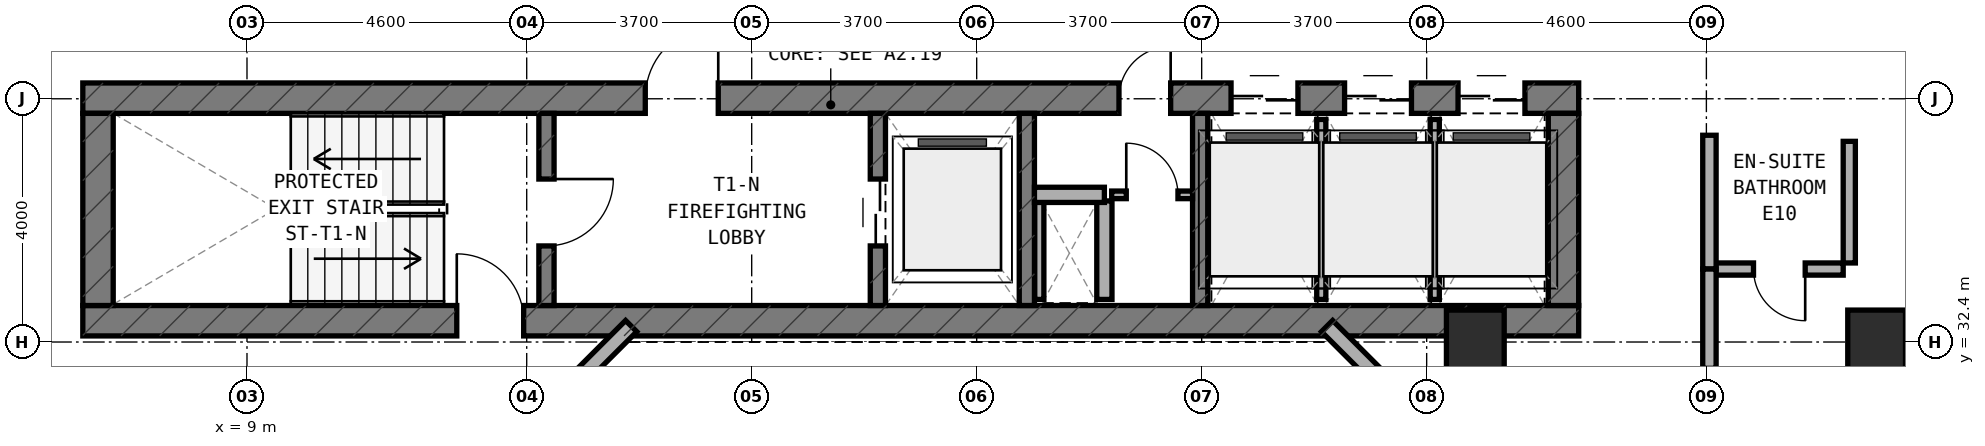
"""IFC4 building model, lengths in metres.
Left out: names, types, materials, properties, quantities, classifications, styles, units other than length and angle.
Written with IfcOpenShell. Run it as: python <this file> out.ifc"""

import sys

from ifc_helpers import new_model, si_unit, direction, frame, frame_2d, origin, origin_2d, place, context, subcontext, project, spatial, rectangle, extrude, element, fill, save


model = new_model("IFC4")
c1 = context("Model", 3, precision=1e-05, world=origin(), true_north=direction((0.0, 1.0)))
c2 = subcontext(c1, "Body", "Model", "MODEL_VIEW")
j1 = project(units=[si_unit("LENGTHUNIT", "METRE"), si_unit("PLANEANGLEUNIT", "RADIAN")], contexts=[c1])
p1 = place(None, origin())
s1 = spatial("IfcSite", under=j1, at=p1, CompositionType="ELEMENT")
p2 = place(p1, origin())
s2 = spatial("IfcBuilding", under=s1, at=p2, CompositionType="ELEMENT")
p3 = place(p2, frame((0.0, 0.0, 80.0)))
s3 = spatial("IfcBuildingStorey", under=s2, at=p3, CompositionType="ELEMENT", Elevation=80.0)
p4 = place(p3, frame((6.3, 32.75, 0.0), z_axis=(0.0, 0.0, 1.0), x_axis=(1.0, 0.0, 0.0)))
e1 = element("IfcWall", 1, at=p4, inside=s3, PredefinedType="SHEAR", context=c2, shape_type="SweptSolid", body=[
    extrude(rectangle(XDim=24.6, YDim=0.5, at=frame_2d((12.3, 0.0))), origin(), (0.0, 0.0, 1.0), 3.5),
])
p5 = place(p4, frame((6.15, 0.0, 0.0)))
e2 = element("IfcOpeningElement", 2, at=p5, cuts=e1, PredefinedType="OPENING", context=c2, shape_type="SweptSolid", body=[
    extrude(rectangle(XDim=1.1, YDim=2.15, at=frame_2d((0.55, 1.075))), frame((0.0, 0.26, 0.0), z_axis=(0.0, -1.0, 0.0), x_axis=(1.0, 0.0, 0.0)), (0.0, 0.0, 1.0), 0.52),
])
p6 = place(p3, frame((6.3, 36.41, 0.0), z_axis=(0.0, 0.0, 1.0), x_axis=(1.0, 0.0, 0.0)))
e3 = element("IfcWall", 3, at=p6, inside=s3, PredefinedType="SHEAR", context=c2, shape_type="SweptSolid", body=[
    extrude(rectangle(XDim=24.6, YDim=0.5, at=frame_2d((12.3, 0.0))), origin(), (0.0, 0.0, 1.0), 3.5),
])
p7 = place(p6, frame((9.25, 0.0, 0.0)))
e4 = element("IfcOpeningElement", 4, at=p7, cuts=e3, PredefinedType="OPENING", context=c2, shape_type="SweptSolid", body=[
    extrude(rectangle(XDim=1.2, YDim=2.15, at=frame_2d((0.6, 1.075))), frame((0.0, 0.26, 0.0), z_axis=(0.0, -1.0, 0.0), x_axis=(1.0, 0.0, 0.0)), (0.0, 0.0, 1.0), 0.52),
])
p8 = place(p6, frame((17.04, 0.0, 0.0)))
e5 = element("IfcOpeningElement", 5, at=p8, cuts=e3, PredefinedType="OPENING", context=c2, shape_type="SweptSolid", body=[
    extrude(rectangle(XDim=0.85, YDim=2.1, at=frame_2d((0.425, 1.05))), frame((0.0, 0.26, 0.0), z_axis=(0.0, -1.0, 0.0), x_axis=(1.0, 0.0, 0.0)), (0.0, 0.0, 1.0), 0.52),
])
p9 = place(p6, frame((18.883, 0.0, 0.0)))
e6 = element("IfcOpeningElement", 6, at=p9, cuts=e3, PredefinedType="OPENING", context=c2, shape_type="SweptSolid", body=[
    extrude(rectangle(XDim=1.1, YDim=2.15, at=frame_2d((0.55, 1.075))), frame((0.0, 0.26, 0.0), z_axis=(0.0, -1.0, 0.0), x_axis=(1.0, 0.0, 0.0)), (0.0, 0.0, 1.0), 0.52),
])
p10 = place(p6, frame((20.75, 0.0, 0.0)))
e7 = element("IfcOpeningElement", 7, at=p10, cuts=e3, PredefinedType="OPENING", context=c2, shape_type="SweptSolid", body=[
    extrude(rectangle(XDim=1.1, YDim=2.15, at=frame_2d((0.55, 1.075))), frame((0.0, 0.26, 0.0), z_axis=(0.0, -1.0, 0.0), x_axis=(1.0, 0.0, 0.0)), (0.0, 0.0, 1.0), 0.52),
])
p11 = place(p6, frame((22.616, 0.0, 0.0)))
e8 = element("IfcOpeningElement", 8, at=p11, cuts=e3, PredefinedType="OPENING", context=c2, shape_type="SweptSolid", body=[
    extrude(rectangle(XDim=1.1, YDim=2.15, at=frame_2d((0.55, 1.075))), frame((0.0, 0.26, 0.0), z_axis=(0.0, -1.0, 0.0), x_axis=(1.0, 0.0, 0.0)), (0.0, 0.0, 1.0), 0.52),
])
for number, where, z_axis, x_axis in (
    (9, (6.55, 33.0, 0.0), (0.0, 0.0, 1.0), (0.0, 1.0, 0.0)),
    (10, (30.65, 33.0, 0.0), (0.0, 0.0, 1.0), (0.0, 1.0, 0.0)),
):
    element("IfcWall", number, at=place(p3, frame(where, z_axis=z_axis, x_axis=x_axis)), inside=s3, PredefinedType="SHEAR", context=c2, shape_type="SweptSolid", body=[
        extrude(rectangle(XDim=3.16, YDim=0.5, at=frame_2d((1.58, 0.0))), origin(), (0.0, 0.0, 1.0), 3.5),
    ])
p12 = place(p3, frame((13.925, 33.0, 0.0), z_axis=(0.0, 0.0, 1.0), x_axis=(0.0, 1.0, 0.0)))
e11 = element("IfcWall", 11, at=p12, inside=s3, PredefinedType="STANDARD", context=c2, shape_type="SweptSolid", body=[
    extrude(rectangle(XDim=3.16, YDim=0.25, at=frame_2d((1.58, 0.0))), origin(), (0.0, 0.0, 1.0), 3.22),
])
p13 = place(p12, frame((0.98, 0.0, 0.0)))
e12 = element("IfcOpeningElement", 12, at=p13, cuts=e11, PredefinedType="OPENING", context=c2, shape_type="SweptSolid", body=[
    extrude(rectangle(XDim=1.1, YDim=2.15, at=frame_2d((0.55, 1.075))), frame((0.0, 0.135, 0.0), z_axis=(0.0, -1.0, 0.0), x_axis=(1.0, 0.0, 0.0)), (0.0, 0.0, 1.0), 0.27),
])
p14 = place(p3, frame((19.375, 33.0, 0.0), z_axis=(0.0, 0.0, 1.0), x_axis=(0.0, 1.0, 0.0)))
e13 = element("IfcWall", 13, at=p14, inside=s3, PredefinedType="STANDARD", context=c2, shape_type="SweptSolid", body=[
    extrude(rectangle(XDim=3.16, YDim=0.25, at=frame_2d((1.58, 0.0))), origin(), (0.0, 0.0, 1.0), 3.22),
])
p15 = place(p14, frame((0.98, 0.0, 0.0)))
e14 = element("IfcOpeningElement", 14, at=p15, cuts=e13, PredefinedType="OPENING", context=c2, shape_type="SweptSolid", body=[
    extrude(rectangle(XDim=1.1, YDim=2.15, at=frame_2d((0.55, 1.075))), frame((0.0, 0.135, 0.0), z_axis=(0.0, -1.0, 0.0), x_axis=(1.0, 0.0, 0.0)), (0.0, 0.0, 1.0), 0.27),
])
for number, where, z_axis, x_axis in (
    (15, (21.825, 33.0, 0.0), (0.0, 0.0, 1.0), (0.0, 1.0, 0.0)),
    (16, (24.675, 33.0, 0.0), (0.0, 0.0, 1.0), (0.0, 1.0, 0.0)),
):
    element("IfcWall", number, at=place(p3, frame(where, z_axis=z_axis, x_axis=x_axis)), inside=s3, PredefinedType="STANDARD", context=c2, shape_type="SweptSolid", body=[
        extrude(rectangle(XDim=3.16, YDim=0.25, at=frame_2d((1.58, 0.0))), origin(), (0.0, 0.0, 1.0), 3.22),
    ])
for number, where, z_axis, x_axis in (
    (17, (35.8, 32.35, 0.0), (0.0, 0.0, 1.0), (1.0, 0.0, 0.0)),
    (18, (29.2, 32.35, 0.0), (0.0, 0.0, 1.0), (1.0, 0.0, 0.0)),
):
    element("IfcColumn", number, at=place(p3, frame(where, z_axis=z_axis, x_axis=x_axis)), inside=s3, PredefinedType="COLUMN", context=c2, shape_type="SweptSolid", body=[
        extrude(rectangle(XDim=0.95, YDim=1.15, at=origin_2d()), origin(), (0.0, 0.0, 1.0), 3.5),
    ])
p16 = place(p3, frame((28.596, 30.828, 0.0), z_axis=(0.0, 0.0, 1.0), x_axis=(-0.707059717605, 0.707153841636, 0.0)))
e19 = element("IfcWall", 19, at=p16, inside=s3, PredefinedType="STANDARD", context=c2, shape_type="SweptSolid", body=[
    extrude(rectangle(XDim=2.594, YDim=0.26, at=frame_2d((1.297, 0.0))), origin(), (0.0, 0.0, 1.0), 3.22),
])
p17 = place(p3, frame((15.318, 32.662, 0.0), z_axis=(0.0, 0.0, 1.0), x_axis=(-0.707106781187, -0.707106781187, 0.0)))
e20 = element("IfcWall", 20, at=p17, inside=s3, PredefinedType="STANDARD", context=c2, shape_type="SweptSolid", body=[
    extrude(rectangle(XDim=2.594, YDim=0.26, at=frame_2d((1.297, 0.0))), origin(), (0.0, 0.0, 1.0), 3.22),
])
p18 = place(p3, frame((22.03, 33.1, 0.0), z_axis=(0.0, 0.0, 1.0), x_axis=(0.0, 1.0, 0.0)))
e21 = element("IfcWall", 21, at=p18, inside=s3, PredefinedType="PARTITIONING", context=c2, shape_type="SweptSolid", body=[
    extrude(rectangle(XDim=1.62, YDim=0.15, at=frame_2d((0.81, 0.0))), origin(), (0.0, 0.0, 1.0), 3.22),
])
p19 = place(p3, frame((23.1, 33.1, 0.0), z_axis=(0.0, 0.0, 1.0), x_axis=(0.0, 1.0, 0.0)))
e22 = element("IfcWall", 22, at=p19, inside=s3, PredefinedType="SOLIDWALL", context=c2, shape_type="SweptSolid", body=[
    extrude(rectangle(XDim=1.62, YDim=0.25, at=frame_2d((0.81, 0.0))), origin(), (0.0, 0.0, 1.0), 3.22),
])
p20 = place(p3, frame((21.95, 34.82, 0.0), z_axis=(0.0, 0.0, 1.0), x_axis=(1.0, 0.0, 0.0)))
e23 = element("IfcWall", 23, at=p20, inside=s3, PredefinedType="SOLIDWALL", context=c2, shape_type="SweptSolid", body=[
    extrude(rectangle(XDim=1.15, YDim=0.25, at=frame_2d((0.575, 0.0))), origin(), (0.0, 0.0, 1.0), 3.22),
])
p21 = place(p3, frame((23.22, 34.82, 0.0), z_axis=(0.0, 0.0, 1.0), x_axis=(1.0, 0.0, 0.0)))
e24 = element("IfcWall", 24, at=p21, inside=s3, PredefinedType="PARTITIONING", context=c2, shape_type="SweptSolid", body=[
    extrude(rectangle(XDim=1.33, YDim=0.125, at=frame_2d((0.665, 0.0))), origin(), (0.0, 0.0, 1.0), 3.22),
])
p22 = place(p21, frame((0.24, 0.0, 0.0)))
e25 = element("IfcOpeningElement", 25, at=p22, cuts=e24, PredefinedType="OPENING", context=c2, shape_type="SweptSolid", body=[
    extrude(rectangle(XDim=0.85, YDim=2.1, at=frame_2d((0.425, 1.05))), frame((0.0, 0.073, 0.0), z_axis=(0.0, -1.0, 0.0), x_axis=(1.0, 0.0, 0.0)), (0.0, 0.0, 1.0), 0.145),
])
p23 = place(p3, frame((26.667, 33.1, 0.0), z_axis=(0.0, 0.0, 1.0), x_axis=(0.0, 1.0, 0.0)))
e26 = element("IfcWall", 26, at=p23, inside=s3, PredefinedType="PARTITIONING", context=c2, shape_type="SweptSolid", body=[
    extrude(rectangle(XDim=2.96, YDim=0.15, at=frame_2d((1.48, 0.0))), origin(), (0.0, 0.0, 1.0), 3.22),
])
p24 = place(p3, frame((28.533, 33.1, 0.0), z_axis=(0.0, 0.0, 1.0), x_axis=(0.0, 1.0, 0.0)))
e27 = element("IfcWall", 27, at=p24, inside=s3, PredefinedType="PARTITIONING", context=c2, shape_type="SweptSolid", body=[
    extrude(rectangle(XDim=2.96, YDim=0.15, at=frame_2d((1.48, 0.0))), origin(), (0.0, 0.0, 1.0), 2.495),
])
p25 = place(p3, frame((33.15, 33.6, 0.0), z_axis=(0.0, 0.0, 1.0), x_axis=(1.0, 0.0, 0.0)))
e28 = element("IfcWall", 28, at=p25, inside=s3, PredefinedType="PLUMBINGWALL", context=c2, shape_type="SweptSolid", body=[
    extrude(rectangle(XDim=2.1, YDim=0.2, at=frame_2d((1.05, 0.0))), origin(), (0.0, 0.0, 1.0), 3.22),
])
p26 = place(p25, frame((0.625, 0.0, 0.0)))
e29 = element("IfcOpeningElement", 29, at=p26, cuts=e28, PredefinedType="OPENING", context=c2, shape_type="SweptSolid", body=[
    extrude(rectangle(XDim=0.85, YDim=2.1, at=frame_2d((0.425, 1.05))), frame((0.0, 0.11, 0.0), z_axis=(0.0, -1.0, 0.0), x_axis=(1.0, 0.0, 0.0)), (0.0, 0.0, 1.0), 0.22),
])
p27 = place(p3, frame((35.35, 33.7, 0.0), z_axis=(0.0, 0.0, 1.0), x_axis=(0.0, 1.0, 0.0)))
e30 = element("IfcWall", 30, at=p27, inside=s3, PredefinedType="PLUMBINGWALL", context=c2, shape_type="SweptSolid", body=[
    extrude(rectangle(XDim=2.0, YDim=0.2, at=frame_2d((1.0, 0.0))), origin(), (0.0, 0.0, 1.0), 2.745),
])
p28 = place(p3, frame((33.05, 33.6, 0.0), z_axis=(0.0, 0.0, 1.0), x_axis=(0.0, 1.0, 0.0)))
e31 = element("IfcWall", 31, at=p28, inside=s3, PredefinedType="SOLIDWALL", context=c2, shape_type="SweptSolid", body=[
    extrude(rectangle(XDim=2.2, YDim=0.22, at=frame_2d((1.1, 0.0))), origin(), (0.0, 0.0, 1.0), 3.22),
])
p29 = place(p3, frame((33.05, 29.383, 0.0), z_axis=(0.0, 0.0, 1.0), x_axis=(0.0, 1.0, 0.0)))
e32 = element("IfcWall", 32, at=p29, inside=s3, PredefinedType="SOLIDWALL", context=c2, shape_type="SweptSolid", body=[
    extrude(rectangle(XDim=4.217, YDim=0.22, at=frame_2d((2.108, 0.0))), origin(), (0.0, 0.0, 1.0), 2.495),
])
p30 = place(p29, frame((1.634, 0.0, 0.0)))
e33 = element("IfcOpeningElement", 33, at=p30, cuts=e32, PredefinedType="OPENING", context=c2, shape_type="SweptSolid", body=[
    extrude(rectangle(XDim=0.95, YDim=2.1, at=frame_2d((0.475, 1.05))), frame((0.0, 0.12, 0.0), z_axis=(0.0, -1.0, 0.0), x_axis=(1.0, 0.0, 0.0)), (0.0, 0.0, 1.0), 0.24),
])
p31 = place(p13, frame((1.1, 0.0, 0.0), z_axis=(0.0, 0.0, 1.0), x_axis=(-1.0, 0.0, 0.0)))
e34 = element("IfcDoor", 34, at=p31, inside=s3, OperationType="SINGLE_SWING_LEFT", PredefinedType="DOOR", context=c2, shape_type="SweptSolid", body=[
    extrude(rectangle(XDim=1.1, YDim=2.15, at=frame_2d((0.55, 1.075))), frame((0.0, 0.025, 0.0), z_axis=(0.0, -1.0, 0.0), x_axis=(1.0, 0.0, 0.0)), (0.0, 0.0, 1.0), 0.05),
])
fill(e12, e34)
p32 = place(p7, origin())
e35 = element("IfcDoor", 35, at=p32, inside=s3, OperationType="SINGLE_SWING_RIGHT", PredefinedType="DOOR", context=c2, shape_type="SweptSolid", body=[
    extrude(rectangle(XDim=1.2, YDim=2.15, at=frame_2d((0.6, 1.075))), frame((0.0, 0.025, 0.0), z_axis=(0.0, -1.0, 0.0), x_axis=(1.0, 0.0, 0.0)), (0.0, 0.0, 1.0), 0.05),
])
fill(e4, e35)
p33 = place(p15, origin())
e36 = element("IfcDoor", 36, at=p33, inside=s3, OperationType="DOUBLE_DOOR_SLIDING", PredefinedType="DOOR", context=c2, shape_type="SweptSolid", body=[
    extrude(rectangle(XDim=1.1, YDim=2.15, at=frame_2d((0.55, 1.075))), frame((0.0, 0.025, 0.0), z_axis=(0.0, -1.0, 0.0), x_axis=(1.0, 0.0, 0.0)), (0.0, 0.0, 1.0), 0.05),
])
fill(e14, e36)
p34 = place(p8, origin())
e37 = element("IfcDoor", 37, at=p34, inside=s3, OperationType="SINGLE_SWING_RIGHT", PredefinedType="DOOR", context=c2, shape_type="SweptSolid", body=[
    extrude(rectangle(XDim=0.85, YDim=2.1, at=frame_2d((0.425, 1.05))), frame((0.0, 0.025, 0.0), z_axis=(0.0, -1.0, 0.0), x_axis=(1.0, 0.0, 0.0)), (0.0, 0.0, 1.0), 0.05),
])
fill(e5, e37)
p35 = place(p9, origin())
e38 = element("IfcDoor", 38, at=p35, inside=s3, OperationType="DOUBLE_DOOR_SLIDING", PredefinedType="DOOR", context=c2, shape_type="SweptSolid", body=[
    extrude(rectangle(XDim=1.1, YDim=2.15, at=frame_2d((0.55, 1.075))), frame((0.0, 0.025, 0.0), z_axis=(0.0, -1.0, 0.0), x_axis=(1.0, 0.0, 0.0)), (0.0, 0.0, 1.0), 0.05),
])
fill(e6, e38)
p36 = place(p10, origin())
e39 = element("IfcDoor", 39, at=p36, inside=s3, OperationType="DOUBLE_DOOR_SLIDING", PredefinedType="DOOR", context=c2, shape_type="SweptSolid", body=[
    extrude(rectangle(XDim=1.1, YDim=2.15, at=frame_2d((0.55, 1.075))), frame((0.0, 0.025, 0.0), z_axis=(0.0, -1.0, 0.0), x_axis=(1.0, 0.0, 0.0)), (0.0, 0.0, 1.0), 0.05),
])
fill(e7, e39)
p37 = place(p11, origin())
e40 = element("IfcDoor", 40, at=p37, inside=s3, OperationType="DOUBLE_DOOR_SLIDING", PredefinedType="DOOR", context=c2, shape_type="SweptSolid", body=[
    extrude(rectangle(XDim=1.1, YDim=2.15, at=frame_2d((0.55, 1.075))), frame((0.0, 0.025, 0.0), z_axis=(0.0, -1.0, 0.0), x_axis=(1.0, 0.0, 0.0)), (0.0, 0.0, 1.0), 0.05),
])
fill(e8, e40)
p38 = place(p5, origin())
e41 = element("IfcDoor", 41, at=p38, inside=s3, OperationType="SINGLE_SWING_LEFT", PredefinedType="DOOR", context=c2, shape_type="SweptSolid", body=[
    extrude(rectangle(XDim=1.1, YDim=2.15, at=frame_2d((0.55, 1.075))), frame((0.0, 0.025, 0.0), z_axis=(0.0, -1.0, 0.0), x_axis=(1.0, 0.0, 0.0)), (0.0, 0.0, 1.0), 0.05),
])
fill(e2, e41)
p39 = place(p22, origin())
e42 = element("IfcDoor", 42, at=p39, inside=s3, OperationType="SINGLE_SWING_LEFT", PredefinedType="DOOR", context=c2, shape_type="SweptSolid", body=[
    extrude(rectangle(XDim=0.85, YDim=2.1, at=frame_2d((0.425, 1.05))), frame((0.0, 0.025, 0.0), z_axis=(0.0, -1.0, 0.0), x_axis=(1.0, 0.0, 0.0)), (0.0, 0.0, 1.0), 0.05),
])
fill(e25, e42)
p40 = place(p26, frame((0.85, 0.0, 0.0), z_axis=(0.0, 0.0, 1.0), x_axis=(-1.0, 0.0, 0.0)))
e43 = element("IfcDoor", 43, at=p40, inside=s3, OperationType="SINGLE_SWING_LEFT", PredefinedType="DOOR", context=c2, shape_type="SweptSolid", body=[
    extrude(rectangle(XDim=0.85, YDim=2.1, at=frame_2d((0.425, 1.05))), frame((0.0, 0.025, 0.0), z_axis=(0.0, -1.0, 0.0), x_axis=(1.0, 0.0, 0.0)), (0.0, 0.0, 1.0), 0.05),
])
fill(e29, e43)
save(model, sys.argv[1])
